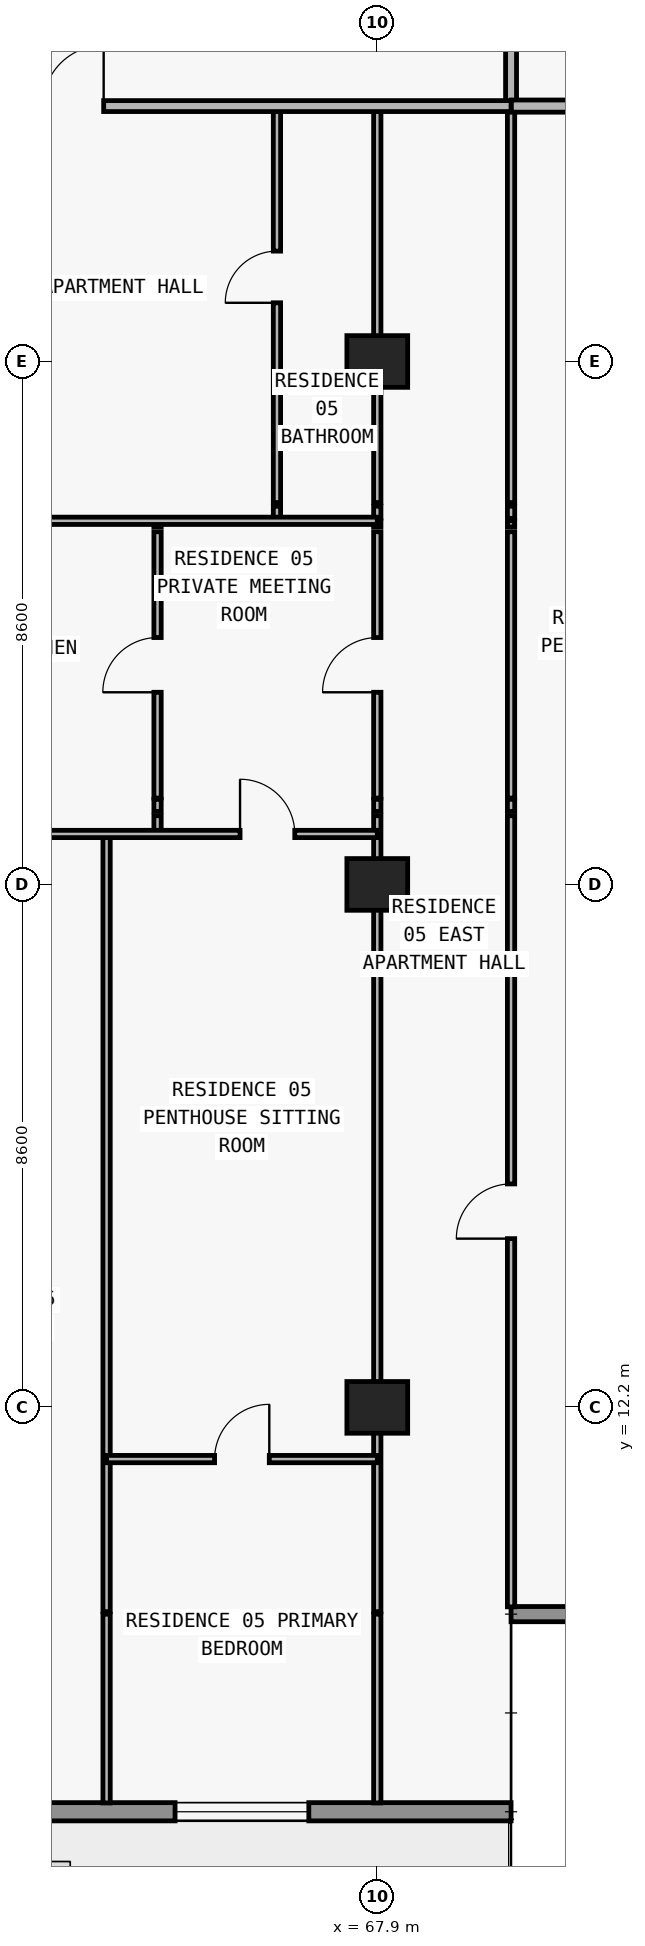
"""IFC4 building model, lengths in metres.
Left out: names, types, materials, properties, quantities, classifications, styles, units other than length and angle.
Written with IfcOpenShell. Run it as: python <this file> out.ifc"""

import sys

from ifc_helpers import new_model, si_unit, direction, frame, frame_2d, origin, origin_2d, place, context, subcontext, project, spatial, rectangle, extrude, element, fill, save


model = new_model("IFC4")
c1 = context("Model", 3, precision=1e-05, world=origin(), true_north=direction((0.0, 1.0)))
c2 = subcontext(c1, "Body", "Model", "MODEL_VIEW")
j1 = project(units=[si_unit("LENGTHUNIT", "METRE"), si_unit("PLANEANGLEUNIT", "RADIAN")], contexts=[c1])
p1 = place(None, origin())
s1 = spatial("IfcSite", under=j1, at=p1, CompositionType="ELEMENT")
p2 = place(p1, origin())
s2 = spatial("IfcBuilding", under=s1, at=p2, CompositionType="ELEMENT")
p3 = place(p2, frame((0.0, 0.0, 112.5)))
s3 = spatial("IfcBuildingStorey", under=s2, at=p3, CompositionType="ELEMENT", Elevation=112.5)
for number, where, z_axis, x_axis in (
    (1, (67.9, 12.2, 0.0), (0.0, 0.0, 1.0), (1.0, 0.0, 0.0)),
    (2, (67.9, 20.8, 0.0), (0.0, 0.0, 1.0), (1.0, 0.0, 0.0)),
    (3, (67.9, 29.4, 0.0), (0.0, 0.0, 1.0), (1.0, 0.0, 0.0)),
):
    element("IfcColumn", number, at=place(p3, frame(where, z_axis=z_axis, x_axis=x_axis)), inside=s3, PredefinedType="COLUMN", context=c2, shape_type="SweptSolid", body=[
        extrude(rectangle(XDim=1.0, YDim=0.85, at=origin_2d()), origin(), (0.0, 0.0, 1.0), 3.05),
    ])
p4 = place(p3, frame((70.1, 5.55, 0.0), z_axis=(0.0, 0.0, 1.0), x_axis=(-1.0, 0.0, 0.0)))
e4 = element("IfcWall", 4, at=p4, inside=s3, PredefinedType="STANDARD", context=c2, shape_type="SweptSolid", body=[
    extrude(rectangle(XDim=62.4, YDim=0.3, at=frame_2d((31.2, 0.0))), origin(), (0.0, 0.0, 1.0), 3.05),
])
p5 = place(p4, frame((57.29, 0.0, 0.0)))
e5 = element("IfcOpeningElement", 5, at=p5, cuts=e4, PredefinedType="OPENING", context=c2, shape_type="SweptSolid", body=[
    extrude(rectangle(XDim=2.0, YDim=2.3, at=frame_2d((1.0, 1.15))), frame((0.0, 0.16, 0.0), z_axis=(0.0, -1.0, 0.0), x_axis=(1.0, 0.0, 0.0)), (0.0, 0.0, 1.0), 0.32),
])
p6 = place(p4, frame((52.61, 0.0, 0.65)))
e6 = element("IfcOpeningElement", 6, at=p6, cuts=e4, PredefinedType="OPENING", context=c2, shape_type="SweptSolid", body=[
    extrude(rectangle(XDim=2.6, YDim=1.85, at=frame_2d((1.3, 0.925))), frame((0.0, 0.16, 0.0), z_axis=(0.0, -1.0, 0.0), x_axis=(1.0, 0.0, 0.0)), (0.0, 0.0, 1.0), 0.32),
])
p7 = place(p4, frame((46.5, 0.0, 0.85)))
e7 = element("IfcOpeningElement", 7, at=p7, cuts=e4, PredefinedType="OPENING", context=c2, shape_type="SweptSolid", body=[
    extrude(rectangle(XDim=2.2, YDim=1.55, at=frame_2d((1.1, 0.775))), frame((0.0, 0.16, 0.0), z_axis=(0.0, -1.0, 0.0), x_axis=(1.0, 0.0, 0.0)), (0.0, 0.0, 1.0), 0.32),
])
p8 = place(p4, frame((40.49, 0.0, 0.0)))
e8 = element("IfcOpeningElement", 8, at=p8, cuts=e4, PredefinedType="OPENING", context=c2, shape_type="SweptSolid", body=[
    extrude(rectangle(XDim=2.0, YDim=2.3, at=frame_2d((1.0, 1.15))), frame((0.0, 0.16, 0.0), z_axis=(0.0, -1.0, 0.0), x_axis=(1.0, 0.0, 0.0)), (0.0, 0.0, 1.0), 0.32),
])
p9 = place(p4, frame((35.81, 0.0, 0.65)))
e9 = element("IfcOpeningElement", 9, at=p9, cuts=e4, PredefinedType="OPENING", context=c2, shape_type="SweptSolid", body=[
    extrude(rectangle(XDim=2.6, YDim=1.85, at=frame_2d((1.3, 0.925))), frame((0.0, 0.16, 0.0), z_axis=(0.0, -1.0, 0.0), x_axis=(1.0, 0.0, 0.0)), (0.0, 0.0, 1.0), 0.32),
])
p10 = place(p4, frame((30.1, 0.0, 0.85)))
e10 = element("IfcOpeningElement", 10, at=p10, cuts=e4, PredefinedType="OPENING", context=c2, shape_type="SweptSolid", body=[
    extrude(rectangle(XDim=2.2, YDim=1.55, at=frame_2d((1.1, 0.775))), frame((0.0, 0.16, 0.0), z_axis=(0.0, -1.0, 0.0), x_axis=(1.0, 0.0, 0.0)), (0.0, 0.0, 1.0), 0.32),
])
p11 = place(p4, frame((24.426, 0.0, 0.0)))
e11 = element("IfcOpeningElement", 11, at=p11, cuts=e4, PredefinedType="OPENING", context=c2, shape_type="SweptSolid", body=[
    extrude(rectangle(XDim=2.0, YDim=2.3, at=frame_2d((1.0, 1.15))), frame((0.0, 0.16, 0.0), z_axis=(0.0, -1.0, 0.0), x_axis=(1.0, 0.0, 0.0)), (0.0, 0.0, 1.0), 0.32),
])
p12 = place(p4, frame((20.126, 0.0, 0.85)))
e12 = element("IfcOpeningElement", 12, at=p12, cuts=e4, PredefinedType="OPENING", context=c2, shape_type="SweptSolid", body=[
    extrude(rectangle(XDim=2.2, YDim=1.55, at=frame_2d((1.1, 0.775))), frame((0.0, 0.16, 0.0), z_axis=(0.0, -1.0, 0.0), x_axis=(1.0, 0.0, 0.0)), (0.0, 0.0, 1.0), 0.32),
])
p13 = place(p4, frame((15.69, 0.0, 0.0)))
e13 = element("IfcOpeningElement", 13, at=p13, cuts=e4, PredefinedType="OPENING", context=c2, shape_type="SweptSolid", body=[
    extrude(rectangle(XDim=2.0, YDim=2.3, at=frame_2d((1.0, 1.15))), frame((0.0, 0.16, 0.0), z_axis=(0.0, -1.0, 0.0), x_axis=(1.0, 0.0, 0.0)), (0.0, 0.0, 1.0), 0.32),
])
p14 = place(p4, frame((11.59, 0.0, 0.85)))
e14 = element("IfcOpeningElement", 14, at=p14, cuts=e4, PredefinedType="OPENING", context=c2, shape_type="SweptSolid", body=[
    extrude(rectangle(XDim=1.8, YDim=1.55, at=frame_2d((0.9, 0.775))), frame((0.0, 0.16, 0.0), z_axis=(0.0, -1.0, 0.0), x_axis=(1.0, 0.0, 0.0)), (0.0, 0.0, 1.0), 0.32),
])
p15 = place(p4, frame((7.626, 0.0, 0.0)))
e15 = element("IfcOpeningElement", 15, at=p15, cuts=e4, PredefinedType="OPENING", context=c2, shape_type="SweptSolid", body=[
    extrude(rectangle(XDim=2.0, YDim=2.3, at=frame_2d((1.0, 1.15))), frame((0.0, 0.16, 0.0), z_axis=(0.0, -1.0, 0.0), x_axis=(1.0, 0.0, 0.0)), (0.0, 0.0, 1.0), 0.32),
])
p16 = place(p4, frame((3.326, 0.0, 0.85)))
e16 = element("IfcOpeningElement", 16, at=p16, cuts=e4, PredefinedType="OPENING", context=c2, shape_type="SweptSolid", body=[
    extrude(rectangle(XDim=2.2, YDim=1.55, at=frame_2d((1.1, 0.775))), frame((0.0, 0.16, 0.0), z_axis=(0.0, -1.0, 0.0), x_axis=(1.0, 0.0, 0.0)), (0.0, 0.0, 1.0), 0.32),
])
p17 = place(p3, frame((70.1, 8.8, 0.0), z_axis=(0.0, 0.0, 1.0), x_axis=(1.0, 0.0, 0.0)))
e17 = element("IfcWall", 17, at=p17, inside=s3, PredefinedType="ELEMENTEDWALL", context=c2, shape_type="SweptSolid", body=[
    extrude(rectangle(XDim=3.65, YDim=0.25, at=frame_2d((1.825, 0.0))), origin(), (0.0, 0.0, 1.0), 3.05),
])
p18 = place(p3, frame((63.448, 5.695, 0.0), z_axis=(0.0, 0.0, 1.0), x_axis=(0.0, 1.0, 0.0)))
e18 = element("IfcWall", 18, at=p18, inside=s3, PredefinedType="PARTITIONING", context=c2, shape_type="SweptSolid", body=[
    extrude(rectangle(XDim=3.105, YDim=0.12, at=frame_2d((1.552, 0.0))), origin(), (0.0, 0.0, 1.0), 3.05),
])
p19 = place(p3, frame((63.448, 8.84, 0.0), z_axis=(0.0, 0.0, 1.0), x_axis=(0.0, 1.0, 0.0)))
e19 = element("IfcWall", 19, at=p19, inside=s3, PredefinedType="PARTITIONING", context=c2, shape_type="SweptSolid", body=[
    extrude(rectangle(XDim=12.79, YDim=0.12, at=frame_2d((6.395, 0.0))), origin(), (0.0, 0.0, 1.0), 3.05),
])
p20 = place(p3, frame((64.286, 21.63, 0.0), z_axis=(0.0, 0.0, 1.0), x_axis=(0.0, 1.0, 0.0)))
e20 = element("IfcWall", 20, at=p20, inside=s3, PredefinedType="PARTITIONING", context=c2, shape_type="SweptSolid", body=[
    extrude(rectangle(XDim=0.3, YDim=0.12, at=frame_2d((0.15, 0.0))), origin(), (0.0, 0.0, 1.0), 3.05),
])
p21 = place(p3, frame((64.286, 22.0, 0.0), z_axis=(0.0, 0.0, 1.0), x_axis=(0.0, 1.0, 0.0)))
e21 = element("IfcWall", 21, at=p21, inside=s3, PredefinedType="PARTITIONING", context=c2, shape_type="SweptSolid", body=[
    extrude(rectangle(XDim=0.2, YDim=0.12, at=frame_2d((0.1, 0.0))), origin(), (0.0, 0.0, 1.0), 3.05),
])
p22 = place(p3, frame((64.286, 22.22, 0.0), z_axis=(0.0, 0.0, 1.0), x_axis=(0.0, 1.0, 0.0)))
e22 = element("IfcWall", 22, at=p22, inside=s3, PredefinedType="PARTITIONING", context=c2, shape_type="SweptSolid", body=[
    extrude(rectangle(XDim=4.38, YDim=0.12, at=frame_2d((2.19, 0.0))), origin(), (0.0, 0.0, 1.0), 3.05),
])
p23 = place(p22, frame((1.74, 0.0, 0.0)))
e23 = element("IfcOpeningElement", 23, at=p23, cuts=e22, PredefinedType="OPENING", context=c2, shape_type="SweptSolid", body=[
    extrude(rectangle(XDim=0.9, YDim=2.15, at=frame_2d((0.45, 1.075))), frame((0.0, 0.07, 0.0), z_axis=(0.0, -1.0, 0.0), x_axis=(1.0, 0.0, 0.0)), (0.0, 0.0, 1.0), 0.14),
])
p24 = place(p3, frame((64.286, 26.68, 0.0), z_axis=(0.0, 0.0, 1.0), x_axis=(0.0, 1.0, 0.0)))
e24 = element("IfcWall", 24, at=p24, inside=s3, PredefinedType="PARTITIONING", context=c2, shape_type="SweptSolid", body=[
    extrude(rectangle(XDim=0.1, YDim=0.12, at=frame_2d((0.05, 0.0))), origin(), (0.0, 0.0, 1.0), 3.05),
])
p25 = place(p3, frame((66.25, 26.82, 0.0), z_axis=(0.0, 0.0, 1.0), x_axis=(0.0, 1.0, 0.0)))
e25 = element("IfcWall", 25, at=p25, inside=s3, PredefinedType="PARTITIONING", context=c2, shape_type="SweptSolid", body=[
    extrude(rectangle(XDim=0.2, YDim=0.12, at=frame_2d((0.1, 0.0))), origin(), (0.0, 0.0, 1.0), 3.05),
])
p26 = place(p3, frame((66.25, 27.08, 0.0), z_axis=(0.0, 0.0, 1.0), x_axis=(0.0, 1.0, 0.0)))
e26 = element("IfcWall", 26, at=p26, inside=s3, PredefinedType="PARTITIONING", context=c2, shape_type="SweptSolid", body=[
    extrude(rectangle(XDim=6.52, YDim=0.12, at=frame_2d((3.26, 0.0))), origin(), (0.0, 0.0, 1.0), 3.05),
])
p27 = place(p26, frame((3.285, 0.0, 0.0)))
e27 = element("IfcOpeningElement", 27, at=p27, cuts=e26, PredefinedType="OPENING", context=c2, shape_type="SweptSolid", body=[
    extrude(rectangle(XDim=0.85, YDim=2.1, at=frame_2d((0.425, 1.05))), frame((0.0, 0.07, 0.0), z_axis=(0.0, -1.0, 0.0), x_axis=(1.0, 0.0, 0.0)), (0.0, 0.0, 1.0), 0.14),
])
p28 = place(p3, frame((67.9, 5.695, 0.0), z_axis=(0.0, 0.0, 1.0), x_axis=(0.0, 1.0, 0.0)))
e28 = element("IfcWall", 28, at=p28, inside=s3, PredefinedType="PARTITIONING", context=c2, shape_type="SweptSolid", body=[
    extrude(rectangle(XDim=3.105, YDim=0.12, at=frame_2d((1.552, 0.0))), origin(), (0.0, 0.0, 1.0), 3.05),
])
p29 = place(p3, frame((67.9, 8.84, 0.0), z_axis=(0.0, 0.0, 1.0), x_axis=(0.0, 1.0, 0.0)))
e29 = element("IfcWall", 29, at=p29, inside=s3, PredefinedType="PARTITIONING", context=c2, shape_type="SweptSolid", body=[
    extrude(rectangle(XDim=13.09, YDim=0.12, at=frame_2d((6.545, 0.0))), origin(), (0.0, 0.0, 1.0), 2.174),
])
p30 = place(p3, frame((67.9, 22.0, 0.0), z_axis=(0.0, 0.0, 1.0), x_axis=(0.0, 1.0, 0.0)))
e30 = element("IfcWall", 30, at=p30, inside=s3, PredefinedType="PARTITIONING", context=c2, shape_type="SweptSolid", body=[
    extrude(rectangle(XDim=0.2, YDim=0.12, at=frame_2d((0.1, 0.0))), origin(), (0.0, 0.0, 1.0), 2.174),
])
p31 = place(p3, frame((67.9, 22.22, 0.0), z_axis=(0.0, 0.0, 1.0), x_axis=(0.0, 1.0, 0.0)))
e31 = element("IfcWall", 31, at=p31, inside=s3, PredefinedType="PARTITIONING", context=c2, shape_type="SweptSolid", body=[
    extrude(rectangle(XDim=4.38, YDim=0.12, at=frame_2d((2.19, 0.0))), origin(), (0.0, 0.0, 1.0), 2.174),
])
p32 = place(p31, frame((1.74, 0.0, 0.0)))
e32 = element("IfcOpeningElement", 32, at=p32, cuts=e31, PredefinedType="OPENING", context=c2, shape_type="SweptSolid", body=[
    extrude(rectangle(XDim=0.9, YDim=2.124, at=frame_2d((0.45, 1.062))), frame((0.0, 0.07, 0.0), z_axis=(0.0, -1.0, 0.0), x_axis=(1.0, 0.0, 0.0)), (0.0, 0.0, 1.0), 0.14),
])
p33 = place(p3, frame((67.9, 26.68, 0.0), z_axis=(0.0, 0.0, 1.0), x_axis=(0.0, 1.0, 0.0)))
e33 = element("IfcWall", 33, at=p33, inside=s3, PredefinedType="PARTITIONING", context=c2, shape_type="SweptSolid", body=[
    extrude(rectangle(XDim=0.1, YDim=0.12, at=frame_2d((0.05, 0.0))), origin(), (0.0, 0.0, 1.0), 2.174),
])
p34 = place(p3, frame((67.9, 26.82, 0.0), z_axis=(0.0, 0.0, 1.0), x_axis=(0.0, 1.0, 0.0)))
e34 = element("IfcWall", 34, at=p34, inside=s3, PredefinedType="PARTITIONING", context=c2, shape_type="SweptSolid", body=[
    extrude(rectangle(XDim=0.2, YDim=0.12, at=frame_2d((0.1, 0.0))), origin(), (0.0, 0.0, 1.0), 2.174),
])
p35 = place(p3, frame((67.9, 27.08, 0.0), z_axis=(0.0, 0.0, 1.0), x_axis=(0.0, 1.0, 0.0)))
e35 = element("IfcWall", 35, at=p35, inside=s3, PredefinedType="PARTITIONING", context=c2, shape_type="SweptSolid", body=[
    extrude(rectangle(XDim=6.52, YDim=0.12, at=frame_2d((3.26, 0.0))), origin(), (0.0, 0.0, 1.0), 2.174),
])
p36 = place(p3, frame((70.1, 8.92, 0.0), z_axis=(0.0, 0.0, 1.0), x_axis=(0.0, 1.0, 0.0)))
e36 = element("IfcWall", 36, at=p36, inside=s3, PredefinedType="PARTITIONING", context=c2, shape_type="SweptSolid", body=[
    extrude(rectangle(XDim=13.01, YDim=0.12, at=frame_2d((6.505, 0.0))), origin(), (0.0, 0.0, 1.0), 3.05),
])
p37 = place(p36, frame((6.055, 0.0, 0.0)))
e37 = element("IfcOpeningElement", 37, at=p37, cuts=e36, PredefinedType="OPENING", context=c2, shape_type="SweptSolid", body=[
    extrude(rectangle(XDim=0.9, YDim=2.15, at=frame_2d((0.45, 1.075))), frame((0.0, 0.07, 0.0), z_axis=(0.0, -1.0, 0.0), x_axis=(1.0, 0.0, 0.0)), (0.0, 0.0, 1.0), 0.14),
])
p38 = place(p3, frame((70.1, 22.0, 0.0), z_axis=(0.0, 0.0, 1.0), x_axis=(0.0, 1.0, 0.0)))
e38 = element("IfcWall", 38, at=p38, inside=s3, PredefinedType="PARTITIONING", context=c2, shape_type="SweptSolid", body=[
    extrude(rectangle(XDim=0.2, YDim=0.12, at=frame_2d((0.1, 0.0))), origin(), (0.0, 0.0, 1.0), 3.05),
])
p39 = place(p3, frame((70.1, 22.22, 0.0), z_axis=(0.0, 0.0, 1.0), x_axis=(0.0, 1.0, 0.0)))
e39 = element("IfcWall", 39, at=p39, inside=s3, PredefinedType="PARTITIONING", context=c2, shape_type="SweptSolid", body=[
    extrude(rectangle(XDim=4.38, YDim=0.12, at=frame_2d((2.19, 0.0))), origin(), (0.0, 0.0, 1.0), 3.05),
])
p40 = place(p3, frame((70.1, 26.68, 0.0), z_axis=(0.0, 0.0, 1.0), x_axis=(0.0, 1.0, 0.0)))
e40 = element("IfcWall", 40, at=p40, inside=s3, PredefinedType="PARTITIONING", context=c2, shape_type="SweptSolid", body=[
    extrude(rectangle(XDim=0.1, YDim=0.12, at=frame_2d((0.05, 0.0))), origin(), (0.0, 0.0, 1.0), 3.05),
])
p41 = place(p3, frame((70.1, 26.82, 0.0), z_axis=(0.0, 0.0, 1.0), x_axis=(0.0, 1.0, 0.0)))
e41 = element("IfcWall", 41, at=p41, inside=s3, PredefinedType="PARTITIONING", context=c2, shape_type="SweptSolid", body=[
    extrude(rectangle(XDim=0.2, YDim=0.12, at=frame_2d((0.1, 0.0))), origin(), (0.0, 0.0, 1.0), 3.05),
])
p42 = place(p3, frame((70.1, 27.08, 0.0), z_axis=(0.0, 0.0, 1.0), x_axis=(0.0, 1.0, 0.0)))
e42 = element("IfcWall", 42, at=p42, inside=s3, PredefinedType="PARTITIONING", context=c2, shape_type="SweptSolid", body=[
    extrude(rectangle(XDim=6.52, YDim=0.12, at=frame_2d((3.26, 0.0))), origin(), (0.0, 0.0, 1.0), 3.05),
])
p43 = place(p3, frame((70.1, 33.605, 0.0), z_axis=(0.0, 0.0, 1.0), x_axis=(0.0, 1.0, 0.0)))
e43 = element("IfcWall", 43, at=p43, inside=s3, PredefinedType="PARTITIONING", context=c2, shape_type="SweptSolid", body=[
    extrude(rectangle(XDim=3.345, YDim=0.18, at=frame_2d((1.672, 0.0))), origin(), (0.0, 0.0, 1.0), 3.05),
])
p44 = place(p3, frame((63.448, 11.35, 0.0), z_axis=(0.0, 0.0, 1.0), x_axis=(1.0, 0.0, 0.0)))
e44 = element("IfcWall", 44, at=p44, inside=s3, PredefinedType="PARTITIONING", context=c2, shape_type="SweptSolid", body=[
    extrude(rectangle(XDim=4.452, YDim=0.12, at=frame_2d((2.226, 0.0))), origin(), (0.0, 0.0, 1.0), 3.05),
])
p45 = place(p44, frame((1.776, 0.0, 0.0)))
e45 = element("IfcOpeningElement", 45, at=p45, cuts=e44, PredefinedType="OPENING", context=c2, shape_type="SweptSolid", body=[
    extrude(rectangle(XDim=0.9, YDim=2.15, at=frame_2d((0.45, 1.075))), frame((0.0, 0.07, 0.0), z_axis=(0.0, -1.0, 0.0), x_axis=(1.0, 0.0, 0.0)), (0.0, 0.0, 1.0), 0.14),
])
p46 = place(p3, frame((59.55, 21.63, 0.0), z_axis=(0.0, 0.0, 1.0), x_axis=(1.0, 0.0, 0.0)))
e46 = element("IfcWall", 46, at=p46, inside=s3, PredefinedType="PARTITIONING", context=c2, shape_type="SweptSolid", body=[
    extrude(rectangle(XDim=8.35, YDim=0.12, at=frame_2d((4.175, 0.0))), origin(), (0.0, 0.0, 1.0), 3.05),
])
p47 = place(p46, frame((1.499, 0.0, 0.0)))
e47 = element("IfcOpeningElement", 47, at=p47, cuts=e46, PredefinedType="OPENING", context=c2, shape_type="SweptSolid", body=[
    extrude(rectangle(XDim=0.9, YDim=2.15, at=frame_2d((0.45, 1.075))), frame((0.0, 0.07, 0.0), z_axis=(0.0, -1.0, 0.0), x_axis=(1.0, 0.0, 0.0)), (0.0, 0.0, 1.0), 0.14),
])
p48 = place(p46, frame((6.093, 0.0, 0.0)))
e48 = element("IfcOpeningElement", 48, at=p48, cuts=e46, PredefinedType="OPENING", context=c2, shape_type="SweptSolid", body=[
    extrude(rectangle(XDim=0.9, YDim=2.15, at=frame_2d((0.45, 1.075))), frame((0.0, 0.07, 0.0), z_axis=(0.0, -1.0, 0.0), x_axis=(1.0, 0.0, 0.0)), (0.0, 0.0, 1.0), 0.14),
])
p49 = place(p3, frame((59.55, 26.78, 0.0), z_axis=(0.0, 0.0, 1.0), x_axis=(1.0, 0.0, 0.0)))
e49 = element("IfcWall", 49, at=p49, inside=s3, PredefinedType="PARTITIONING", context=c2, shape_type="SweptSolid", body=[
    extrude(rectangle(XDim=8.35, YDim=0.12, at=frame_2d((4.175, 0.0))), origin(), (0.0, 0.0, 1.0), 3.05),
])
p50 = place(p49, frame((1.918, 0.0, 0.0)))
e50 = element("IfcOpeningElement", 50, at=p50, cuts=e49, PredefinedType="OPENING", context=c2, shape_type="SweptSolid", body=[
    extrude(rectangle(XDim=0.9, YDim=2.15, at=frame_2d((0.45, 1.075))), frame((0.0, 0.07, 0.0), z_axis=(0.0, -1.0, 0.0), x_axis=(1.0, 0.0, 0.0)), (0.0, 0.0, 1.0), 0.14),
])
p51 = place(p3, frame((59.55, 33.6, 0.0), z_axis=(0.0, 0.0, 1.0), x_axis=(1.0, 0.0, 0.0)))
e51 = element("IfcWall", 51, at=p51, inside=s3, PredefinedType="PARTITIONING", context=c2, shape_type="SweptSolid", body=[
    extrude(rectangle(XDim=10.55, YDim=0.18, at=frame_2d((5.275, 0.0))), origin(), (0.0, 0.0, 1.0), 3.05),
])
p52 = place(p51, frame((2.85, 0.0, 0.0)))
e52 = element("IfcOpeningElement", 52, at=p52, cuts=e51, PredefinedType="OPENING", context=c2, shape_type="SweptSolid", body=[
    extrude(rectangle(XDim=1.0, YDim=2.2, at=frame_2d((0.5, 1.1))), frame((0.0, 0.1, 0.0), z_axis=(0.0, -1.0, 0.0), x_axis=(1.0, 0.0, 0.0)), (0.0, 0.0, 1.0), 0.2),
])
p53 = place(p3, frame((70.105, 33.6, 0.0), z_axis=(0.0, 0.0, 1.0), x_axis=(1.0, 0.0, 0.0)))
e53 = element("IfcWall", 53, at=p53, inside=s3, PredefinedType="PARTITIONING", context=c2, shape_type="SweptSolid", body=[
    extrude(rectangle(XDim=3.5, YDim=0.2, at=frame_2d((1.75, 0.0))), origin(), (0.0, 0.0, 1.0), 3.05),
])
p54 = place(p16, origin())
e54 = element("IfcWindow", 54, at=p54, inside=s3, PartitioningType="SINGLE_PANEL", PredefinedType="WINDOW", context=c2, shape_type="SweptSolid", body=[
    extrude(rectangle(XDim=2.2, YDim=1.55, at=frame_2d((1.1, 0.775))), frame((0.0, 0.03, 0.0), z_axis=(0.0, -1.0, 0.0), x_axis=(1.0, 0.0, 0.0)), (0.0, 0.0, 1.0), 0.06),
])
fill(e16, e54)
p55 = place(p52, origin())
e55 = element("IfcDoor", 55, at=p55, inside=s3, OperationType="SINGLE_SWING_RIGHT", PredefinedType="DOOR", context=c2, shape_type="SweptSolid", body=[
    extrude(rectangle(XDim=1.0, YDim=2.2, at=frame_2d((0.5, 1.1))), frame((0.0, 0.025, 0.0), z_axis=(0.0, -1.0, 0.0), x_axis=(1.0, 0.0, 0.0)), (0.0, 0.0, 1.0), 0.05),
])
fill(e52, e55)
p56 = place(p27, origin())
e56 = element("IfcDoor", 56, at=p56, inside=s3, OperationType="SINGLE_SWING_LEFT", PredefinedType="DOOR", context=c2, shape_type="SweptSolid", body=[
    extrude(rectangle(XDim=0.85, YDim=2.1, at=frame_2d((0.425, 1.05))), frame((0.0, 0.025, 0.0), z_axis=(0.0, -1.0, 0.0), x_axis=(1.0, 0.0, 0.0)), (0.0, 0.0, 1.0), 0.05),
])
fill(e27, e56)
p57 = place(p23, origin())
e57 = element("IfcDoor", 57, at=p57, inside=s3, OperationType="SINGLE_SWING_LEFT", PredefinedType="DOOR", context=c2, shape_type="SweptSolid", body=[
    extrude(rectangle(XDim=0.9, YDim=2.15, at=frame_2d((0.45, 1.075))), frame((0.0, 0.025, 0.0), z_axis=(0.0, -1.0, 0.0), x_axis=(1.0, 0.0, 0.0)), (0.0, 0.0, 1.0), 0.05),
])
fill(e23, e57)
p58 = place(p48, origin())
e58 = element("IfcDoor", 58, at=p58, inside=s3, OperationType="SINGLE_SWING_LEFT", PredefinedType="DOOR", context=c2, shape_type="SweptSolid", body=[
    extrude(rectangle(XDim=0.9, YDim=2.15, at=frame_2d((0.45, 1.075))), frame((0.0, 0.025, 0.0), z_axis=(0.0, -1.0, 0.0), x_axis=(1.0, 0.0, 0.0)), (0.0, 0.0, 1.0), 0.05),
])
fill(e48, e58)
p59 = place(p45, origin())
e59 = element("IfcDoor", 59, at=p59, inside=s3, OperationType="SINGLE_SWING_RIGHT", PredefinedType="DOOR", context=c2, shape_type="SweptSolid", body=[
    extrude(rectangle(XDim=0.9, YDim=2.15, at=frame_2d((0.45, 1.075))), frame((0.0, 0.025, 0.0), z_axis=(0.0, -1.0, 0.0), x_axis=(1.0, 0.0, 0.0)), (0.0, 0.0, 1.0), 0.05),
])
fill(e45, e59)
p60 = place(p32, origin())
e60 = element("IfcDoor", 60, at=p60, inside=s3, OperationType="SINGLE_SWING_LEFT", PredefinedType="DOOR", context=c2, shape_type="SweptSolid", body=[
    extrude(rectangle(XDim=0.9, YDim=2.124, at=frame_2d((0.45, 1.062))), frame((0.0, 0.025, 0.0), z_axis=(0.0, -1.0, 0.0), x_axis=(1.0, 0.0, 0.0)), (0.0, 0.0, 1.0), 0.05),
])
fill(e32, e60)
p61 = place(p37, origin())
e61 = element("IfcDoor", 61, at=p61, inside=s3, OperationType="SINGLE_SWING_LEFT", PredefinedType="DOOR", context=c2, shape_type="SweptSolid", body=[
    extrude(rectangle(XDim=0.9, YDim=2.15, at=frame_2d((0.45, 1.075))), frame((0.0, 0.025, 0.0), z_axis=(0.0, -1.0, 0.0), x_axis=(1.0, 0.0, 0.0)), (0.0, 0.0, 1.0), 0.05),
])
fill(e37, e61)
save(model, sys.argv[1])
